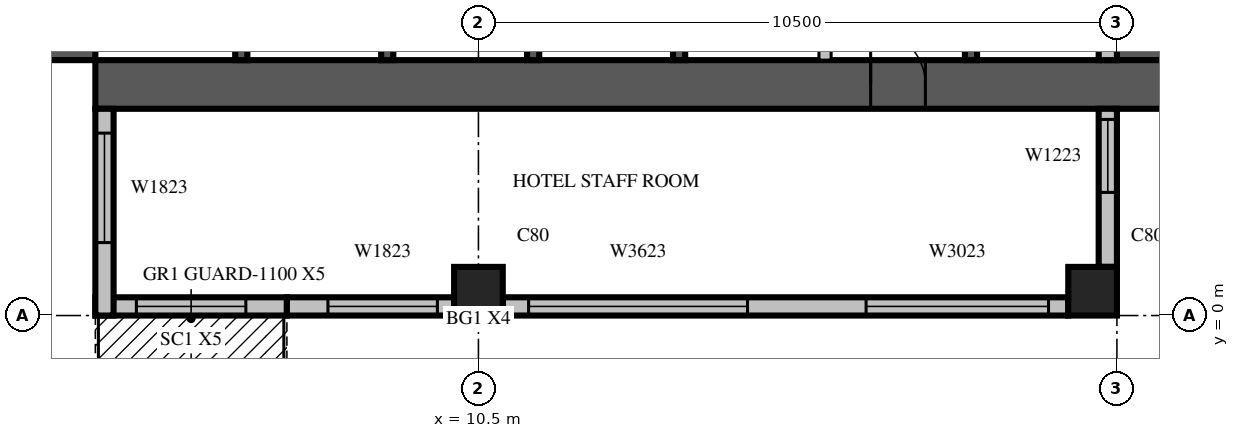
"""IFC4 building model, lengths in metres.
Left out: names, types, materials, properties, quantities, classifications, styles, units other than length and angle.
Written with IfcOpenShell. Run it as: python <this file> out.ifc"""

import sys

from ifc_helpers import new_model, si_unit, direction, frame, frame_2d, origin, origin_2d, place, context, subcontext, project, spatial, rectangle, extrude, source, transform, mapped, element, fill, save


model = new_model("IFC4")
c1 = context("Model", 3, precision=1e-05, world=origin(), true_north=direction((0.0, 1.0)))
c2 = subcontext(c1, "Body", "Model", "MODEL_VIEW")
j1 = project(units=[si_unit("LENGTHUNIT", "METRE"), si_unit("PLANEANGLEUNIT", "RADIAN")], contexts=[c1])
p1 = place(None, origin())
s1 = spatial("IfcSite", under=j1, at=p1, CompositionType="ELEMENT")
p2 = place(p1, origin())
s2 = spatial("IfcBuilding", under=s1, at=p2, CompositionType="ELEMENT")
p3 = place(p2, frame((0.0, 0.0, 261.4)))
s3 = spatial("IfcBuildingStorey", under=s2, at=p3, CompositionType="ELEMENT", Elevation=261.4)
m1 = source(origin(), c2, "Body", "SweptSolid", [
    extrude(rectangle(XDim=0.8, YDim=0.8, at=origin_2d()), origin(), (0.0, 0.0, 1.0), 3.8),
])
for number, where, z_axis, x_axis in (
    (1, (10.5, 0.4, 0.0), (0.0, 0.0, 1.0), (1.0, 0.0, 0.0)),
    (2, (20.6, 0.4, 0.0), (0.0, 0.0, 1.0), (1.0, 0.0, 0.0)),
):
    element("IfcColumn", number, at=place(p3, frame(where, z_axis=z_axis, x_axis=x_axis)), inside=s3, PredefinedType="COLUMN", context=c2, shape_type="MappedRepresentation", body=[
        mapped(m1, transform((0.0, 0.0, 0.0), scale=1.0)),
    ])
m2 = source(origin(), c2, "Body", "SweptSolid", [
    extrude(rectangle(XDim=17.6, YDim=0.8, at=frame_2d((8.8, 0.0))), origin(), (0.0, 0.0, 1.0), 3.8),
])
p4 = place(p3, frame((3.8, 4.2, 0.0), z_axis=(0.0, 0.0, 1.0), x_axis=(0.0, 1.0, 0.0)))
e3 = element("IfcWall", 3, at=p4, inside=s3, PredefinedType="SHEAR", context=c2, shape_type="MappedRepresentation", body=[
    mapped(m2, transform((0.0, 0.0, 0.0), scale=1.0)),
])
m3 = source(origin(), c2, "Body", "SweptSolid", [
    extrude(rectangle(XDim=2.2, YDim=2.1, at=frame_2d((1.1, 1.05))), frame((0.0, 0.41, 0.0), z_axis=(0.0, -1.0, 0.0), x_axis=(1.0, 0.0, 0.0)), (0.0, 0.0, 1.0), 0.82),
])
p5 = place(p4, frame((4.2, 0.0, 0.0)))
e4 = element("IfcOpeningElement", 4, at=p5, cuts=e3, PredefinedType="OPENING", context=c2, shape_type="MappedRepresentation", body=[
    mapped(m3, transform((0.0, 0.0, 0.0), scale=1.0)),
])
m4 = source(origin(), c2, "Body", "SweptSolid", [
    extrude(rectangle(XDim=0.9, YDim=2.1, at=frame_2d((0.45, 1.05))), frame((0.0, 0.41, 0.0), z_axis=(0.0, -1.0, 0.0), x_axis=(1.0, 0.0, 0.0)), (0.0, 0.0, 1.0), 0.82),
])
p6 = place(p4, frame((10.95, 0.0, 0.0)))
e5 = element("IfcOpeningElement", 5, at=p6, cuts=e3, PredefinedType="OPENING", context=c2, shape_type="MappedRepresentation", body=[
    mapped(m4, transform((0.0, 0.0, 0.0), scale=1.0)),
])
m5 = source(origin(), c2, "Body", "SweptSolid", [
    extrude(rectangle(XDim=16.8, YDim=0.8, at=frame_2d((8.4, 0.0))), origin(), (0.0, 0.0, 1.0), 3.8),
])
p7 = place(p3, frame((21.4, 4.2, 0.0), z_axis=(0.0, 0.0, 1.0), x_axis=(0.0, 1.0, 0.0)))
e6 = element("IfcWall", 6, at=p7, inside=s3, PredefinedType="SHEAR", context=c2, shape_type="MappedRepresentation", body=[
    mapped(m5, transform((0.0, 0.0, 0.0), scale=1.0)),
])
m6 = source(origin(), c2, "Body", "SweptSolid", [
    extrude(rectangle(XDim=1.2, YDim=2.1, at=frame_2d((0.6, 1.05))), frame((0.0, 0.41, 0.0), z_axis=(0.0, -1.0, 0.0), x_axis=(1.0, 0.0, 0.0)), (0.0, 0.0, 1.0), 0.82),
])
p8 = place(p7, frame((14.7, 0.0, 0.0)))
e7 = element("IfcOpeningElement", 7, at=p8, cuts=e6, PredefinedType="OPENING", context=c2, shape_type="MappedRepresentation", body=[
    mapped(m6, transform((0.0, 0.0, 0.0), scale=1.0)),
])
p9 = place(p3, frame((4.2, 3.8, 0.0), z_axis=(0.0, 0.0, 1.0), x_axis=(1.0, 0.0, 0.0)))
e8 = element("IfcWall", 8, at=p9, inside=s3, PredefinedType="SHEAR", context=c2, shape_type="MappedRepresentation", body=[
    mapped(m2, transform((0.0, 0.0, 0.0), scale=1.0)),
])
p10 = place(p9, frame((12.75, 0.0, 0.0)))
e9 = element("IfcOpeningElement", 9, at=p10, cuts=e8, PredefinedType="OPENING", context=c2, shape_type="MappedRepresentation", body=[
    mapped(m4, transform((0.0, 0.0, 0.0), scale=1.0)),
])
m7 = source(origin(), c2, "Body", "SweptSolid", [
    extrude(rectangle(XDim=3.15, YDim=0.3, at=frame_2d((1.575, 0.0))), origin(), (0.0, 0.0, 1.0), 3.4),
])
p11 = place(p3, frame((4.2, 0.15, 0.0), z_axis=(0.0, 0.0, 1.0), x_axis=(1.0, 0.0, 0.0)))
e10 = element("IfcWall", 10, at=p11, inside=s3, PredefinedType="STANDARD", context=c2, shape_type="MappedRepresentation", body=[
    mapped(m7, transform((0.0, 0.0, 0.0), scale=1.0)),
])
m8 = source(origin(), c2, "Body", "SweptSolid", [
    extrude(rectangle(XDim=1.8, YDim=2.4, at=frame_2d((0.9, 1.2))), frame((0.0, 0.16, 0.0), z_axis=(0.0, -1.0, 0.0), x_axis=(1.0, 0.0, 0.0)), (0.0, 0.0, 1.0), 0.32),
])
p12 = place(p11, frame((0.675, 0.0, 0.0)))
e11 = element("IfcOpeningElement", 11, at=p12, cuts=e10, PredefinedType="OPENING", context=c2, shape_type="MappedRepresentation", body=[
    mapped(m8, transform((0.0, 0.0, 0.0), scale=1.0)),
])
m9 = source(origin(), c2, "Body", "SweptSolid", [
    extrude(rectangle(XDim=2.75, YDim=0.3, at=frame_2d((1.375, 0.0))), origin(), (0.0, 0.0, 1.0), 3.4),
])
p13 = place(p3, frame((7.35, 0.15, 0.0), z_axis=(0.0, 0.0, 1.0), x_axis=(1.0, 0.0, 0.0)))
e12 = element("IfcWall", 12, at=p13, inside=s3, PredefinedType="STANDARD", context=c2, shape_type="MappedRepresentation", body=[
    mapped(m9, transform((0.0, 0.0, 0.0), scale=1.0)),
])
m10 = source(origin(), c2, "Body", "SweptSolid", [
    extrude(rectangle(XDim=1.8, YDim=2.3, at=frame_2d((0.9, 1.15))), frame((0.0, 0.16, 0.0), z_axis=(0.0, -1.0, 0.0), x_axis=(1.0, 0.0, 0.0)), (0.0, 0.0, 1.0), 0.32),
])
p14 = place(p13, frame((0.675, 0.0, 0.6)))
e13 = element("IfcOpeningElement", 13, at=p14, cuts=e12, PredefinedType="OPENING", context=c2, shape_type="MappedRepresentation", body=[
    mapped(m10, transform((0.0, 0.0, 0.0), scale=1.0)),
])
m11 = source(origin(), c2, "Body", "SweptSolid", [
    extrude(rectangle(XDim=9.3, YDim=0.3, at=frame_2d((4.65, 0.0))), origin(), (0.0, 0.0, 1.0), 3.4),
])
p15 = place(p3, frame((10.9, 0.15, 0.0), z_axis=(0.0, 0.0, 1.0), x_axis=(1.0, 0.0, 0.0)))
e14 = element("IfcWall", 14, at=p15, inside=s3, PredefinedType="STANDARD", context=c2, shape_type="MappedRepresentation", body=[
    mapped(m11, transform((0.0, 0.0, 0.0), scale=1.0)),
])
m12 = source(origin(), c2, "Body", "SweptSolid", [
    extrude(rectangle(XDim=3.6, YDim=2.3, at=frame_2d((1.8, 1.15))), frame((0.0, 0.16, 0.0), z_axis=(0.0, -1.0, 0.0), x_axis=(1.0, 0.0, 0.0)), (0.0, 0.0, 1.0), 0.32),
])
p16 = place(p15, frame((0.425, 0.0, 0.6)))
e15 = element("IfcOpeningElement", 15, at=p16, cuts=e14, PredefinedType="OPENING", context=c2, shape_type="MappedRepresentation", body=[
    mapped(m12, transform((0.0, 0.0, 0.0), scale=1.0)),
])
m13 = source(origin(), c2, "Body", "SweptSolid", [
    extrude(rectangle(XDim=3.0, YDim=2.3, at=frame_2d((1.5, 1.15))), frame((0.0, 0.16, 0.0), z_axis=(0.0, -1.0, 0.0), x_axis=(1.0, 0.0, 0.0)), (0.0, 0.0, 1.0), 0.32),
])
p17 = place(p15, frame((5.975, 0.0, 0.6)))
e16 = element("IfcOpeningElement", 16, at=p17, cuts=e14, PredefinedType="OPENING", context=c2, shape_type="MappedRepresentation", body=[
    mapped(m13, transform((0.0, 0.0, 0.0), scale=1.0)),
])
m14 = source(origin(), c2, "Body", "SweptSolid", [
    extrude(rectangle(XDim=2.6, YDim=0.3, at=frame_2d((1.3, 0.0))), origin(), (0.0, 0.0, 1.0), 3.4),
])
p18 = place(p3, frame((20.85, 0.8, 0.0), z_axis=(0.0, 0.0, 1.0), x_axis=(0.0, 1.0, 0.0)))
e17 = element("IfcWall", 17, at=p18, inside=s3, PredefinedType="STANDARD", context=c2, shape_type="MappedRepresentation", body=[
    mapped(m14, transform((0.0, 0.0, 0.0), scale=1.0)),
])
m15 = source(origin(), c2, "Body", "SweptSolid", [
    extrude(rectangle(XDim=1.2, YDim=2.3, at=frame_2d((0.6, 1.15))), frame((0.0, 0.16, 0.0), z_axis=(0.0, -1.0, 0.0), x_axis=(1.0, 0.0, 0.0)), (0.0, 0.0, 1.0), 0.32),
])
p19 = place(p18, frame((1.225, 0.0, 0.6)))
e18 = element("IfcOpeningElement", 18, at=p19, cuts=e17, PredefinedType="OPENING", context=c2, shape_type="MappedRepresentation", body=[
    mapped(m15, transform((0.0, 0.0, 0.0), scale=1.0)),
])
m16 = source(origin(), c2, "Body", "SweptSolid", [
    extrude(rectangle(XDim=1.05, YDim=0.3, at=frame_2d((0.525, 0.0))), origin(), (0.0, 0.0, 1.0), 3.4),
])
p20 = place(p3, frame((20.85, 4.2, 0.0), z_axis=(0.0, 0.0, 1.0), x_axis=(0.0, 1.0, 0.0)))
e19 = element("IfcWall", 19, at=p20, inside=s3, PredefinedType="STANDARD", context=c2, shape_type="MappedRepresentation", body=[
    mapped(m16, transform((0.0, 0.0, 0.0), scale=1.0)),
])
m17 = source(origin(), c2, "Body", "SweptSolid", [
    extrude(rectangle(XDim=3.4, YDim=0.3, at=frame_2d((1.7, 0.0))), origin(), (0.0, 0.0, 1.0), 3.4),
])
p21 = place(p3, frame((4.35, 3.4, 0.0), z_axis=(0.0, 0.0, 1.0), x_axis=(0.0, -1.0, 0.0)))
e20 = element("IfcWall", 20, at=p21, inside=s3, PredefinedType="STANDARD", context=c2, shape_type="MappedRepresentation", body=[
    mapped(m17, transform((0.0, 0.0, 0.0), scale=1.0)),
])
p22 = place(p21, frame((0.4, 0.0, 0.6)))
e21 = element("IfcOpeningElement", 21, at=p22, cuts=e20, PredefinedType="OPENING", context=c2, shape_type="MappedRepresentation", body=[
    mapped(m10, transform((0.0, 0.0, 0.0), scale=1.0)),
])
m18 = source(origin(), c2, "Body", "SweptSolid", [
    extrude(rectangle(XDim=3.1, YDim=0.2, at=frame_2d((1.55, 0.0))), origin(), (0.0, 0.0, 1.0), 3.8),
])
for number, where, z_axis, x_axis in (
    (22, (6.6, 4.2, 0.0), (0.0, 0.0, 1.0), (0.0, 1.0, 0.0)),
    (23, (9.0, 4.2, 0.0), (0.0, 0.0, 1.0), (0.0, 1.0, 0.0)),
    (24, (11.4, 4.2, 0.0), (0.0, 0.0, 1.0), (0.0, 1.0, 0.0)),
):
    element("IfcWall", number, at=place(p3, frame(where, z_axis=z_axis, x_axis=x_axis)), inside=s3, PredefinedType="SOLIDWALL", context=c2, shape_type="MappedRepresentation", body=[
        mapped(m18, transform((0.0, 0.0, 0.0), scale=1.0)),
    ])
m19 = source(origin(), c2, "Body", "SweptSolid", [
    extrude(rectangle(XDim=3.1, YDim=0.2, at=frame_2d((1.55, 0.0))), origin(), (0.0, 0.0, 1.0), 3.4),
])
for number, where, z_axis, x_axis in (
    (25, (13.8, 4.2, 0.0), (0.0, 0.0, 1.0), (0.0, 1.0, 0.0)),
    (26, (18.6, 4.2, 0.0), (0.0, 0.0, 1.0), (0.0, 1.0, 0.0)),
):
    element("IfcWall", number, at=place(p3, frame(where, z_axis=z_axis, x_axis=x_axis)), inside=s3, PredefinedType="SOLIDWALL", context=c2, shape_type="MappedRepresentation", body=[
        mapped(m19, transform((0.0, 0.0, 0.0), scale=1.0)),
    ])
m20 = source(origin(), c2, "Body", "SweptSolid", [
    extrude(rectangle(XDim=3.1, YDim=0.2, at=frame_2d((1.55, 0.0))), origin(), (0.0, 0.0, 1.0), 3.4),
])
p23 = place(p3, frame((16.2, 4.2, 0.0), z_axis=(0.0, 0.0, 1.0), x_axis=(0.0, 1.0, 0.0)))
e27 = element("IfcWall", 27, at=p23, inside=s3, PredefinedType="PARTITIONING", context=c2, shape_type="MappedRepresentation", body=[
    mapped(m20, transform((0.0, 0.0, 0.0), scale=1.0)),
])
m21 = source(origin(), c2, "Body", "SweptSolid", [
    extrude(rectangle(XDim=1.8, YDim=2.4, at=frame_2d((0.9, 1.2))), frame((0.0, 0.025, 0.0), z_axis=(0.0, -1.0, 0.0), x_axis=(1.0, 0.0, 0.0)), (0.0, 0.0, 1.0), 0.05),
])
p24 = place(p12, origin())
e28 = element("IfcDoor", 28, at=p24, inside=s3, OperationType="SLIDING_TO_LEFT", PredefinedType="DOOR", context=c2, shape_type="MappedRepresentation", body=[
    mapped(m21, transform((0.0, 0.0, 0.0), scale=1.0)),
])
fill(e11, e28)
m22 = source(origin(), c2, "Body", "SweptSolid", [
    extrude(rectangle(XDim=1.8, YDim=2.3, at=frame_2d((0.9, 1.15))), frame((0.0, 0.03, 0.0), z_axis=(0.0, -1.0, 0.0), x_axis=(1.0, 0.0, 0.0)), (0.0, 0.0, 1.0), 0.06),
])
p25 = place(p14, origin())
e29 = element("IfcWindow", 29, at=p25, inside=s3, PartitioningType="SINGLE_PANEL", PredefinedType="WINDOW", context=c2, shape_type="MappedRepresentation", body=[
    mapped(m22, transform((0.0, 0.0, 0.0), scale=1.0)),
])
fill(e13, e29)
m23 = source(origin(), c2, "Body", "SweptSolid", [
    extrude(rectangle(XDim=3.6, YDim=2.3, at=frame_2d((1.8, 1.15))), frame((0.0, 0.03, 0.0), z_axis=(0.0, -1.0, 0.0), x_axis=(1.0, 0.0, 0.0)), (0.0, 0.0, 1.0), 0.06),
])
p26 = place(p16, origin())
e30 = element("IfcWindow", 30, at=p26, inside=s3, PartitioningType="SINGLE_PANEL", PredefinedType="WINDOW", context=c2, shape_type="MappedRepresentation", body=[
    mapped(m23, transform((0.0, 0.0, 0.0), scale=1.0)),
])
fill(e15, e30)
m24 = source(origin(), c2, "Body", "SweptSolid", [
    extrude(rectangle(XDim=3.0, YDim=2.3, at=frame_2d((1.5, 1.15))), frame((0.0, 0.03, 0.0), z_axis=(0.0, -1.0, 0.0), x_axis=(1.0, 0.0, 0.0)), (0.0, 0.0, 1.0), 0.06),
])
p27 = place(p17, origin())
e31 = element("IfcWindow", 31, at=p27, inside=s3, PartitioningType="SINGLE_PANEL", PredefinedType="WINDOW", context=c2, shape_type="MappedRepresentation", body=[
    mapped(m24, transform((0.0, 0.0, 0.0), scale=1.0)),
])
fill(e16, e31)
m25 = source(origin(), c2, "Body", "SweptSolid", [
    extrude(rectangle(XDim=1.2, YDim=2.3, at=frame_2d((0.6, 1.15))), frame((0.0, 0.03, 0.0), z_axis=(0.0, -1.0, 0.0), x_axis=(1.0, 0.0, 0.0)), (0.0, 0.0, 1.0), 0.06),
])
p28 = place(p19, origin())
e32 = element("IfcWindow", 32, at=p28, inside=s3, PartitioningType="SINGLE_PANEL", PredefinedType="WINDOW", context=c2, shape_type="MappedRepresentation", body=[
    mapped(m25, transform((0.0, 0.0, 0.0), scale=1.0)),
])
fill(e18, e32)
p29 = place(p22, origin())
e33 = element("IfcWindow", 33, at=p29, inside=s3, PartitioningType="SINGLE_PANEL", PredefinedType="WINDOW", context=c2, shape_type="MappedRepresentation", body=[
    mapped(m22, transform((0.0, 0.0, 0.0), scale=1.0)),
])
fill(e21, e33)
m26 = source(origin(), c2, "Body", "SweptSolid", [
    extrude(rectangle(XDim=0.9, YDim=2.1, at=frame_2d((0.45, 1.05))), frame((0.0, 0.025, 0.0), z_axis=(0.0, -1.0, 0.0), x_axis=(1.0, 0.0, 0.0)), (0.0, 0.0, 1.0), 0.05),
])
p30 = place(p10, origin())
e34 = element("IfcDoor", 34, at=p30, inside=s3, OperationType="SINGLE_SWING_LEFT", PredefinedType="DOOR", context=c2, shape_type="MappedRepresentation", body=[
    mapped(m26, transform((0.0, 0.0, 0.0), scale=1.0)),
])
fill(e9, e34)
save(model, sys.argv[1])
